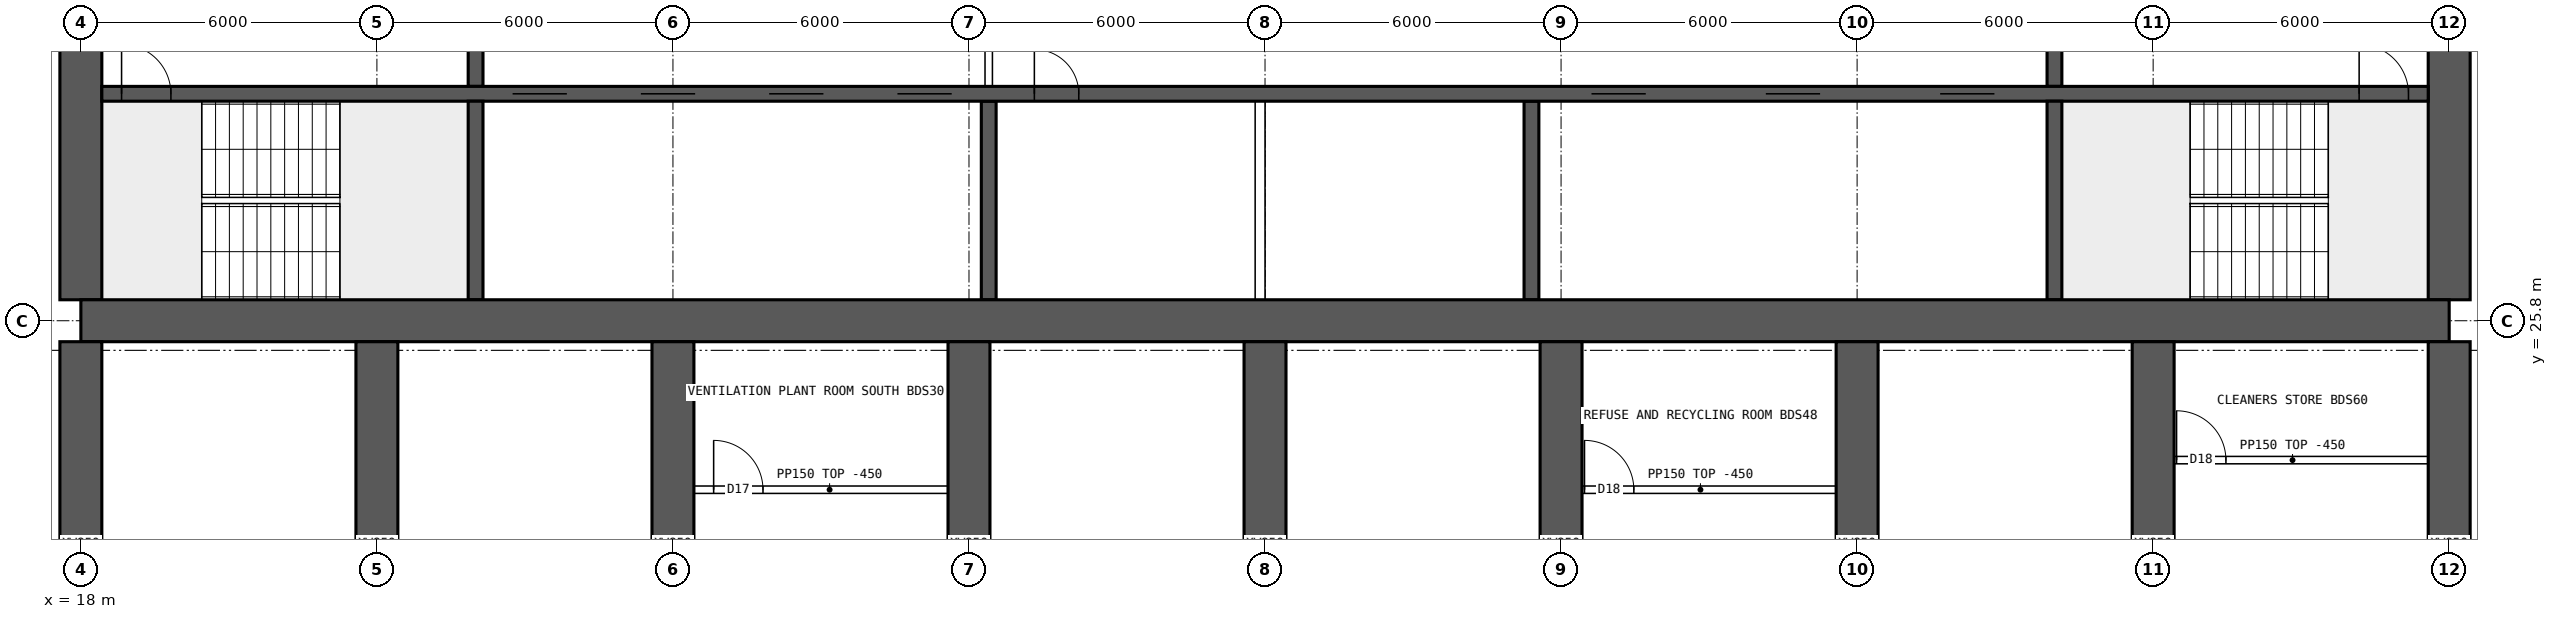
"""IFC4 building model, lengths in metres.
Left out: names, types, materials, properties, quantities, classifications, styles, units other than length and angle.
Written with IfcOpenShell. Run it as: python <this file> out.ifc"""

import sys

from ifc_helpers import new_model, si_unit, direction, frame, frame_2d, origin, place, context, subcontext, project, spatial, rectangle, extrude, element, fill, save


model = new_model("IFC4")
c1 = context("Model", 3, precision=1e-05, world=origin(), true_north=direction((0.0, 1.0)))
c2 = subcontext(c1, "Body", "Model", "MODEL_VIEW")
j1 = project(units=[si_unit("LENGTHUNIT", "METRE"), si_unit("PLANEANGLEUNIT", "RADIAN")], contexts=[c1])
p1 = place(None, origin())
s1 = spatial("IfcSite", under=j1, at=p1, CompositionType="ELEMENT")
p2 = place(p1, origin())
s2 = spatial("IfcBuilding", under=s1, at=p2, CompositionType="ELEMENT")
p3 = place(p2, frame((0.0, 0.0, 189.85)))
s3 = spatial("IfcBuildingStorey", under=s2, at=p3, CompositionType="ELEMENT", Elevation=189.85)
p4 = place(p3, frame((18.0, 25.8, 0.0), z_axis=(0.0, 0.0, 1.0), x_axis=(1.0, 0.0, 0.0)))
e1 = element("IfcWall", 1, at=p4, inside=s3, PredefinedType="SHEAR", context=c2, shape_type="SweptSolid", body=[
    extrude(rectangle(XDim=48.0, YDim=0.85, at=frame_2d((24.0, 0.0))), origin(), (0.0, 0.0, 1.0), 3.75),
])
p5 = place(p3, frame((18.0, 26.225, 0.0), z_axis=(0.0, 0.0, 1.0), x_axis=(0.0, 1.0, 0.0)))
e2 = element("IfcWall", 2, at=p5, inside=s3, PredefinedType="SHEAR", context=c2, shape_type="SweptSolid", body=[
    extrude(rectangle(XDim=11.55, YDim=0.85, at=frame_2d((5.775, 0.0))), origin(), (0.0, 0.0, 1.0), 3.75),
])
p6 = place(p5, frame((5.075, 0.0, 0.0)))
e3 = element("IfcOpeningElement", 3, at=p6, cuts=e2, PredefinedType="OPENING", context=c2, shape_type="SweptSolid", body=[
    extrude(rectangle(XDim=1.2, YDim=2.1, at=frame_2d((0.6, 1.05))), frame((0.0, 0.435, 0.0), z_axis=(0.0, -1.0, 0.0), x_axis=(1.0, 0.0, 0.0)), (0.0, 0.0, 1.0), 0.87),
])
p7 = place(p3, frame((66.0, 26.225, 0.0), z_axis=(0.0, 0.0, 1.0), x_axis=(0.0, 1.0, 0.0)))
e4 = element("IfcWall", 4, at=p7, inside=s3, PredefinedType="SHEAR", context=c2, shape_type="SweptSolid", body=[
    extrude(rectangle(XDim=11.55, YDim=0.85, at=frame_2d((5.775, 0.0))), origin(), (0.0, 0.0, 1.0), 3.75),
])
p8 = place(p7, frame((5.075, 0.0, 0.0)))
e5 = element("IfcOpeningElement", 5, at=p8, cuts=e4, PredefinedType="OPENING", context=c2, shape_type="SweptSolid", body=[
    extrude(rectangle(XDim=1.2, YDim=2.1, at=frame_2d((0.6, 1.05))), frame((0.0, 0.435, 0.0), z_axis=(0.0, -1.0, 0.0), x_axis=(1.0, 0.0, 0.0)), (0.0, 0.0, 1.0), 0.87),
])
p9 = place(p3, frame((18.425, 30.4, 0.0), z_axis=(0.0, 0.0, 1.0), x_axis=(1.0, 0.0, 0.0)))
e6 = element("IfcWall", 6, at=p9, inside=s3, PredefinedType="SHEAR", context=c2, shape_type="SweptSolid", body=[
    extrude(rectangle(XDim=47.15, YDim=0.3, at=frame_2d((23.575, 0.0))), origin(), (0.0, 0.0, 1.0), 3.75),
])
p10 = place(p9, frame((0.4, 0.0, 0.0)))
e7 = element("IfcOpeningElement", 7, at=p10, cuts=e6, PredefinedType="OPENING", context=c2, shape_type="SweptSolid", body=[
    extrude(rectangle(XDim=1.0, YDim=2.1, at=frame_2d((0.5, 1.05))), frame((0.0, 0.16, 0.0), z_axis=(0.0, -1.0, 0.0), x_axis=(1.0, 0.0, 0.0)), (0.0, 0.0, 1.0), 0.32),
])
p11 = place(p9, frame((45.75, 0.0, 0.0)))
e8 = element("IfcOpeningElement", 8, at=p11, cuts=e6, PredefinedType="OPENING", context=c2, shape_type="SweptSolid", body=[
    extrude(rectangle(XDim=1.0, YDim=2.1, at=frame_2d((0.5, 1.05))), frame((0.0, 0.16, 0.0), z_axis=(0.0, -1.0, 0.0), x_axis=(1.0, 0.0, 0.0)), (0.0, 0.0, 1.0), 0.32),
])
p12 = place(p9, frame((8.325, 0.0, 0.0)))
e9 = element("IfcOpeningElement", 9, at=p12, cuts=e6, PredefinedType="OPENING", context=c2, shape_type="SweptSolid", body=[
    extrude(rectangle(XDim=1.1, YDim=2.1, at=frame_2d((0.55, 1.05))), frame((0.0, 0.16, 0.0), z_axis=(0.0, -1.0, 0.0), x_axis=(1.0, 0.0, 0.0)), (0.0, 0.0, 1.0), 0.32),
])
p13 = place(p9, frame((10.925, 0.0, 0.0)))
e10 = element("IfcOpeningElement", 10, at=p13, cuts=e6, PredefinedType="OPENING", context=c2, shape_type="SweptSolid", body=[
    extrude(rectangle(XDim=1.1, YDim=2.1, at=frame_2d((0.55, 1.05))), frame((0.0, 0.16, 0.0), z_axis=(0.0, -1.0, 0.0), x_axis=(1.0, 0.0, 0.0)), (0.0, 0.0, 1.0), 0.32),
])
p14 = place(p9, frame((13.525, 0.0, 0.0)))
e11 = element("IfcOpeningElement", 11, at=p14, cuts=e6, PredefinedType="OPENING", context=c2, shape_type="SweptSolid", body=[
    extrude(rectangle(XDim=1.1, YDim=2.1, at=frame_2d((0.55, 1.05))), frame((0.0, 0.16, 0.0), z_axis=(0.0, -1.0, 0.0), x_axis=(1.0, 0.0, 0.0)), (0.0, 0.0, 1.0), 0.32),
])
p15 = place(p9, frame((16.125, 0.0, 0.0)))
e12 = element("IfcOpeningElement", 12, at=p15, cuts=e6, PredefinedType="OPENING", context=c2, shape_type="SweptSolid", body=[
    extrude(rectangle(XDim=1.1, YDim=2.1, at=frame_2d((0.55, 1.05))), frame((0.0, 0.16, 0.0), z_axis=(0.0, -1.0, 0.0), x_axis=(1.0, 0.0, 0.0)), (0.0, 0.0, 1.0), 0.32),
])
p16 = place(p9, frame((18.9, 0.0, 0.0)))
e13 = element("IfcOpeningElement", 13, at=p16, cuts=e6, PredefinedType="OPENING", context=c2, shape_type="SweptSolid", body=[
    extrude(rectangle(XDim=0.9, YDim=2.1, at=frame_2d((0.45, 1.05))), frame((0.0, 0.16, 0.0), z_axis=(0.0, -1.0, 0.0), x_axis=(1.0, 0.0, 0.0)), (0.0, 0.0, 1.0), 0.32),
])
p17 = place(p9, frame((30.192, 0.0, 0.0)))
e14 = element("IfcOpeningElement", 14, at=p17, cuts=e6, PredefinedType="OPENING", context=c2, shape_type="SweptSolid", body=[
    extrude(rectangle(XDim=1.1, YDim=2.1, at=frame_2d((0.55, 1.05))), frame((0.0, 0.16, 0.0), z_axis=(0.0, -1.0, 0.0), x_axis=(1.0, 0.0, 0.0)), (0.0, 0.0, 1.0), 0.32),
])
p18 = place(p9, frame((33.725, 0.0, 0.0)))
e15 = element("IfcOpeningElement", 15, at=p18, cuts=e6, PredefinedType="OPENING", context=c2, shape_type="SweptSolid", body=[
    extrude(rectangle(XDim=1.1, YDim=2.1, at=frame_2d((0.55, 1.05))), frame((0.0, 0.16, 0.0), z_axis=(0.0, -1.0, 0.0), x_axis=(1.0, 0.0, 0.0)), (0.0, 0.0, 1.0), 0.32),
])
p19 = place(p9, frame((37.258, 0.0, 0.0)))
e16 = element("IfcOpeningElement", 16, at=p19, cuts=e6, PredefinedType="OPENING", context=c2, shape_type="SweptSolid", body=[
    extrude(rectangle(XDim=1.1, YDim=2.1, at=frame_2d((0.55, 1.05))), frame((0.0, 0.16, 0.0), z_axis=(0.0, -1.0, 0.0), x_axis=(1.0, 0.0, 0.0)), (0.0, 0.0, 1.0), 0.32),
])
for number, where, z_axis, x_axis in (
    (17, (26.0, 26.225, 0.0), (0.0, 0.0, 1.0), (0.0, 1.0, 0.0)),
    (18, (58.0, 26.225, 0.0), (0.0, 0.0, 1.0), (0.0, 1.0, 0.0)),
):
    element("IfcWall", number, at=place(p3, frame(where, z_axis=z_axis, x_axis=x_axis)), inside=s3, PredefinedType="SHEAR", context=c2, shape_type="SweptSolid", body=[
        extrude(rectangle(XDim=4.025, YDim=0.3, at=frame_2d((2.012, 0.0))), origin(), (0.0, 0.0, 1.0), 3.75),
    ])
p20 = place(p3, frame((26.0, 30.55, 0.0), z_axis=(0.0, 0.0, 1.0), x_axis=(0.0, 1.0, 0.0)))
e19 = element("IfcWall", 19, at=p20, inside=s3, PredefinedType="SHEAR", context=c2, shape_type="SweptSolid", body=[
    extrude(rectangle(XDim=3.9, YDim=0.3, at=frame_2d((1.95, 0.0))), origin(), (0.0, 0.0, 1.0), 3.75),
])
p21 = place(p20, frame((1.4, 0.0, 0.0)))
e20 = element("IfcOpeningElement", 20, at=p21, cuts=e19, PredefinedType="OPENING", context=c2, shape_type="SweptSolid", body=[
    extrude(rectangle(XDim=1.2, YDim=2.1, at=frame_2d((0.6, 1.05))), frame((0.0, 0.16, 0.0), z_axis=(0.0, -1.0, 0.0), x_axis=(1.0, 0.0, 0.0)), (0.0, 0.0, 1.0), 0.32),
])
p22 = place(p3, frame((58.0, 30.55, 0.0), z_axis=(0.0, 0.0, 1.0), x_axis=(0.0, 1.0, 0.0)))
e21 = element("IfcWall", 21, at=p22, inside=s3, PredefinedType="SHEAR", context=c2, shape_type="SweptSolid", body=[
    extrude(rectangle(XDim=3.9, YDim=0.3, at=frame_2d((1.95, 0.0))), origin(), (0.0, 0.0, 1.0), 3.75),
])
p23 = place(p22, frame((1.4, 0.0, 0.0)))
e22 = element("IfcOpeningElement", 22, at=p23, cuts=e21, PredefinedType="OPENING", context=c2, shape_type="SweptSolid", body=[
    extrude(rectangle(XDim=1.2, YDim=2.1, at=frame_2d((0.6, 1.05))), frame((0.0, 0.16, 0.0), z_axis=(0.0, -1.0, 0.0), x_axis=(1.0, 0.0, 0.0)), (0.0, 0.0, 1.0), 0.32),
])
for number, where, z_axis, x_axis in (
    (23, (36.4, 26.225, 0.0), (0.0, 0.0, 1.0), (0.0, 1.0, 0.0)),
    (24, (47.4, 26.225, 0.0), (0.0, 0.0, 1.0), (0.0, 1.0, 0.0)),
):
    element("IfcWall", number, at=place(p3, frame(where, z_axis=z_axis, x_axis=x_axis)), inside=s3, PredefinedType="SHEAR", context=c2, shape_type="SweptSolid", body=[
        extrude(rectangle(XDim=4.025, YDim=0.3, at=frame_2d((2.012, 0.0))), origin(), (0.0, 0.0, 1.0), 3.75),
    ])
for number, where, z_axis, x_axis in (
    (25, (18.0, 17.2, 0.0), (0.0, 0.0, 1.0), (0.0, 1.0, 0.0)),
    (26, (24.0, 17.2, 0.0), (0.0, 0.0, 1.0), (0.0, 1.0, 0.0)),
    (27, (30.0, 17.2, 0.0), (0.0, 0.0, 1.0), (0.0, 1.0, 0.0)),
    (28, (36.0, 17.2, 0.0), (0.0, 0.0, 1.0), (0.0, 1.0, 0.0)),
    (29, (42.0, 17.2, 0.0), (0.0, 0.0, 1.0), (0.0, 1.0, 0.0)),
    (30, (48.0, 17.2, 0.0), (0.0, 0.0, 1.0), (0.0, 1.0, 0.0)),
    (31, (54.0, 17.2, 0.0), (0.0, 0.0, 1.0), (0.0, 1.0, 0.0)),
    (32, (60.0, 17.2, 0.0), (0.0, 0.0, 1.0), (0.0, 1.0, 0.0)),
    (33, (66.0, 17.2, 0.0), (0.0, 0.0, 1.0), (0.0, 1.0, 0.0)),
):
    element("IfcWall", number, at=place(p3, frame(where, z_axis=z_axis, x_axis=x_axis)), inside=s3, PredefinedType="SHEAR", context=c2, shape_type="SweptSolid", body=[
        extrude(rectangle(XDim=8.175, YDim=0.85, at=frame_2d((4.087, 0.0))), origin(), (0.0, 0.0, 1.0), 3.75),
    ])
p24 = place(p3, frame((36.4, 30.55, 0.0), z_axis=(0.0, 0.0, 1.0), x_axis=(0.0, 1.0, 0.0)))
e34 = element("IfcWall", 34, at=p24, inside=s3, PredefinedType="SOLIDWALL", context=c2, shape_type="SweptSolid", body=[
    extrude(rectangle(XDim=3.9, YDim=0.15, at=frame_2d((1.95, 0.0))), origin(), (0.0, 0.0, 1.0), 3.3),
])
p25 = place(p24, frame((1.15, 0.0, 0.0)))
e35 = element("IfcOpeningElement", 35, at=p25, cuts=e34, PredefinedType="OPENING", context=c2, shape_type="SweptSolid", body=[
    extrude(rectangle(XDim=1.6, YDim=2.1, at=frame_2d((0.8, 1.05))), frame((0.0, 0.085, 0.0), z_axis=(0.0, -1.0, 0.0), x_axis=(1.0, 0.0, 0.0)), (0.0, 0.0, 1.0), 0.17),
])
p26 = place(p3, frame((41.9, 26.225, 0.0), z_axis=(0.0, 0.0, 1.0), x_axis=(0.0, 1.0, 0.0)))
e36 = element("IfcWall", 36, at=p26, inside=s3, PredefinedType="SOLIDWALL", context=c2, shape_type="SweptSolid", body=[
    extrude(rectangle(XDim=4.025, YDim=0.2, at=frame_2d((2.012, 0.0))), origin(), (0.0, 0.0, 1.0), 3.3),
])
p27 = place(p3, frame((30.425, 22.375, 0.0), z_axis=(0.0, 0.0, 1.0), x_axis=(1.0, 0.0, 0.0)))
e37 = element("IfcWall", 37, at=p27, inside=s3, PredefinedType="PARTITIONING", context=c2, shape_type="SweptSolid", body=[
    extrude(rectangle(XDim=5.5, YDim=0.15, at=frame_2d((2.75, 0.0))), origin(), (0.0, 0.0, 1.0), 3.3),
])
p28 = place(p27, frame((0.4, 0.0, 0.0)))
e38 = element("IfcOpeningElement", 38, at=p28, cuts=e37, PredefinedType="OPENING", context=c2, shape_type="SweptSolid", body=[
    extrude(rectangle(XDim=1.0, YDim=2.1, at=frame_2d((0.5, 1.05))), frame((0.0, 0.085, 0.0), z_axis=(0.0, -1.0, 0.0), x_axis=(1.0, 0.0, 0.0)), (0.0, 0.0, 1.0), 0.17),
])
p29 = place(p3, frame((48.075, 22.375, 0.0), z_axis=(0.0, 0.0, 1.0), x_axis=(1.0, 0.0, 0.0)))
e39 = element("IfcWall", 39, at=p29, inside=s3, PredefinedType="PARTITIONING", context=c2, shape_type="SweptSolid", body=[
    extrude(rectangle(XDim=5.5, YDim=0.15, at=frame_2d((2.75, 0.0))), origin(), (0.0, 0.0, 1.0), 3.3),
])
p30 = place(p29, frame((0.4, 0.0, 0.0)))
e40 = element("IfcOpeningElement", 40, at=p30, cuts=e39, PredefinedType="OPENING", context=c2, shape_type="SweptSolid", body=[
    extrude(rectangle(XDim=1.0, YDim=2.1, at=frame_2d((0.5, 1.05))), frame((0.0, 0.085, 0.0), z_axis=(0.0, -1.0, 0.0), x_axis=(1.0, 0.0, 0.0)), (0.0, 0.0, 1.0), 0.17),
])
p31 = place(p3, frame((60.075, 22.975, 0.0), z_axis=(0.0, 0.0, 1.0), x_axis=(1.0, 0.0, 0.0)))
e41 = element("IfcWall", 41, at=p31, inside=s3, PredefinedType="PARTITIONING", context=c2, shape_type="SweptSolid", body=[
    extrude(rectangle(XDim=5.5, YDim=0.15, at=frame_2d((2.75, 0.0))), origin(), (0.0, 0.0, 1.0), 3.3),
])
p32 = place(p31, frame((0.4, 0.0, 0.0)))
e42 = element("IfcOpeningElement", 42, at=p32, cuts=e41, PredefinedType="OPENING", context=c2, shape_type="SweptSolid", body=[
    extrude(rectangle(XDim=1.0, YDim=2.1, at=frame_2d((0.5, 1.05))), frame((0.0, 0.085, 0.0), z_axis=(0.0, -1.0, 0.0), x_axis=(1.0, 0.0, 0.0)), (0.0, 0.0, 1.0), 0.17),
])
p33 = place(p10, origin())
e43 = element("IfcDoor", 43, at=p33, inside=s3, OperationType="SINGLE_SWING_LEFT", PredefinedType="DOOR", context=c2, shape_type="SweptSolid", body=[
    extrude(rectangle(XDim=1.0, YDim=2.1, at=frame_2d((0.5, 1.05))), frame((0.0, 0.025, 0.0), z_axis=(0.0, -1.0, 0.0), x_axis=(1.0, 0.0, 0.0)), (0.0, 0.0, 1.0), 0.05),
])
fill(e7, e43)
p34 = place(p11, origin())
e44 = element("IfcDoor", 44, at=p34, inside=s3, OperationType="SINGLE_SWING_LEFT", PredefinedType="DOOR", context=c2, shape_type="SweptSolid", body=[
    extrude(rectangle(XDim=1.0, YDim=2.1, at=frame_2d((0.5, 1.05))), frame((0.0, 0.025, 0.0), z_axis=(0.0, -1.0, 0.0), x_axis=(1.0, 0.0, 0.0)), (0.0, 0.0, 1.0), 0.05),
])
fill(e8, e44)
p35 = place(p12, origin())
e45 = element("IfcDoor", 45, at=p35, inside=s3, OperationType="DOUBLE_DOOR_SLIDING", PredefinedType="DOOR", context=c2, shape_type="SweptSolid", body=[
    extrude(rectangle(XDim=1.1, YDim=2.1, at=frame_2d((0.55, 1.05))), frame((0.0, 0.025, 0.0), z_axis=(0.0, -1.0, 0.0), x_axis=(1.0, 0.0, 0.0)), (0.0, 0.0, 1.0), 0.05),
])
fill(e9, e45)
p36 = place(p13, origin())
e46 = element("IfcDoor", 46, at=p36, inside=s3, OperationType="DOUBLE_DOOR_SLIDING", PredefinedType="DOOR", context=c2, shape_type="SweptSolid", body=[
    extrude(rectangle(XDim=1.1, YDim=2.1, at=frame_2d((0.55, 1.05))), frame((0.0, 0.025, 0.0), z_axis=(0.0, -1.0, 0.0), x_axis=(1.0, 0.0, 0.0)), (0.0, 0.0, 1.0), 0.05),
])
fill(e10, e46)
p37 = place(p14, origin())
e47 = element("IfcDoor", 47, at=p37, inside=s3, OperationType="DOUBLE_DOOR_SLIDING", PredefinedType="DOOR", context=c2, shape_type="SweptSolid", body=[
    extrude(rectangle(XDim=1.1, YDim=2.1, at=frame_2d((0.55, 1.05))), frame((0.0, 0.025, 0.0), z_axis=(0.0, -1.0, 0.0), x_axis=(1.0, 0.0, 0.0)), (0.0, 0.0, 1.0), 0.05),
])
fill(e11, e47)
p38 = place(p15, origin())
e48 = element("IfcDoor", 48, at=p38, inside=s3, OperationType="DOUBLE_DOOR_SLIDING", PredefinedType="DOOR", context=c2, shape_type="SweptSolid", body=[
    extrude(rectangle(XDim=1.1, YDim=2.1, at=frame_2d((0.55, 1.05))), frame((0.0, 0.025, 0.0), z_axis=(0.0, -1.0, 0.0), x_axis=(1.0, 0.0, 0.0)), (0.0, 0.0, 1.0), 0.05),
])
fill(e12, e48)
p39 = place(p16, origin())
e49 = element("IfcDoor", 49, at=p39, inside=s3, OperationType="SINGLE_SWING_LEFT", PredefinedType="DOOR", context=c2, shape_type="SweptSolid", body=[
    extrude(rectangle(XDim=0.9, YDim=2.1, at=frame_2d((0.45, 1.05))), frame((0.0, 0.025, 0.0), z_axis=(0.0, -1.0, 0.0), x_axis=(1.0, 0.0, 0.0)), (0.0, 0.0, 1.0), 0.05),
])
fill(e13, e49)
p40 = place(p17, origin())
e50 = element("IfcDoor", 50, at=p40, inside=s3, OperationType="DOUBLE_DOOR_SLIDING", PredefinedType="DOOR", context=c2, shape_type="SweptSolid", body=[
    extrude(rectangle(XDim=1.1, YDim=2.1, at=frame_2d((0.55, 1.05))), frame((0.0, 0.025, 0.0), z_axis=(0.0, -1.0, 0.0), x_axis=(1.0, 0.0, 0.0)), (0.0, 0.0, 1.0), 0.05),
])
fill(e14, e50)
p41 = place(p18, origin())
e51 = element("IfcDoor", 51, at=p41, inside=s3, OperationType="DOUBLE_DOOR_SLIDING", PredefinedType="DOOR", context=c2, shape_type="SweptSolid", body=[
    extrude(rectangle(XDim=1.1, YDim=2.1, at=frame_2d((0.55, 1.05))), frame((0.0, 0.025, 0.0), z_axis=(0.0, -1.0, 0.0), x_axis=(1.0, 0.0, 0.0)), (0.0, 0.0, 1.0), 0.05),
])
fill(e15, e51)
p42 = place(p19, origin())
e52 = element("IfcDoor", 52, at=p42, inside=s3, OperationType="DOUBLE_DOOR_SLIDING", PredefinedType="DOOR", context=c2, shape_type="SweptSolid", body=[
    extrude(rectangle(XDim=1.1, YDim=2.1, at=frame_2d((0.55, 1.05))), frame((0.0, 0.025, 0.0), z_axis=(0.0, -1.0, 0.0), x_axis=(1.0, 0.0, 0.0)), (0.0, 0.0, 1.0), 0.05),
])
fill(e16, e52)
p43 = place(p28, origin())
e53 = element("IfcDoor", 53, at=p43, inside=s3, OperationType="SINGLE_SWING_LEFT", PredefinedType="DOOR", context=c2, shape_type="SweptSolid", body=[
    extrude(rectangle(XDim=1.0, YDim=2.1, at=frame_2d((0.5, 1.05))), frame((0.0, 0.025, 0.0), z_axis=(0.0, -1.0, 0.0), x_axis=(1.0, 0.0, 0.0)), (0.0, 0.0, 1.0), 0.05),
])
fill(e38, e53)
p44 = place(p30, origin())
e54 = element("IfcDoor", 54, at=p44, inside=s3, OperationType="SINGLE_SWING_LEFT", PredefinedType="DOOR", context=c2, shape_type="SweptSolid", body=[
    extrude(rectangle(XDim=1.0, YDim=2.1, at=frame_2d((0.5, 1.05))), frame((0.0, 0.025, 0.0), z_axis=(0.0, -1.0, 0.0), x_axis=(1.0, 0.0, 0.0)), (0.0, 0.0, 1.0), 0.05),
])
fill(e40, e54)
p45 = place(p32, origin())
e55 = element("IfcDoor", 55, at=p45, inside=s3, OperationType="SINGLE_SWING_LEFT", PredefinedType="DOOR", context=c2, shape_type="SweptSolid", body=[
    extrude(rectangle(XDim=1.0, YDim=2.1, at=frame_2d((0.5, 1.05))), frame((0.0, 0.025, 0.0), z_axis=(0.0, -1.0, 0.0), x_axis=(1.0, 0.0, 0.0)), (0.0, 0.0, 1.0), 0.05),
])
fill(e42, e55)
save(model, sys.argv[1])
